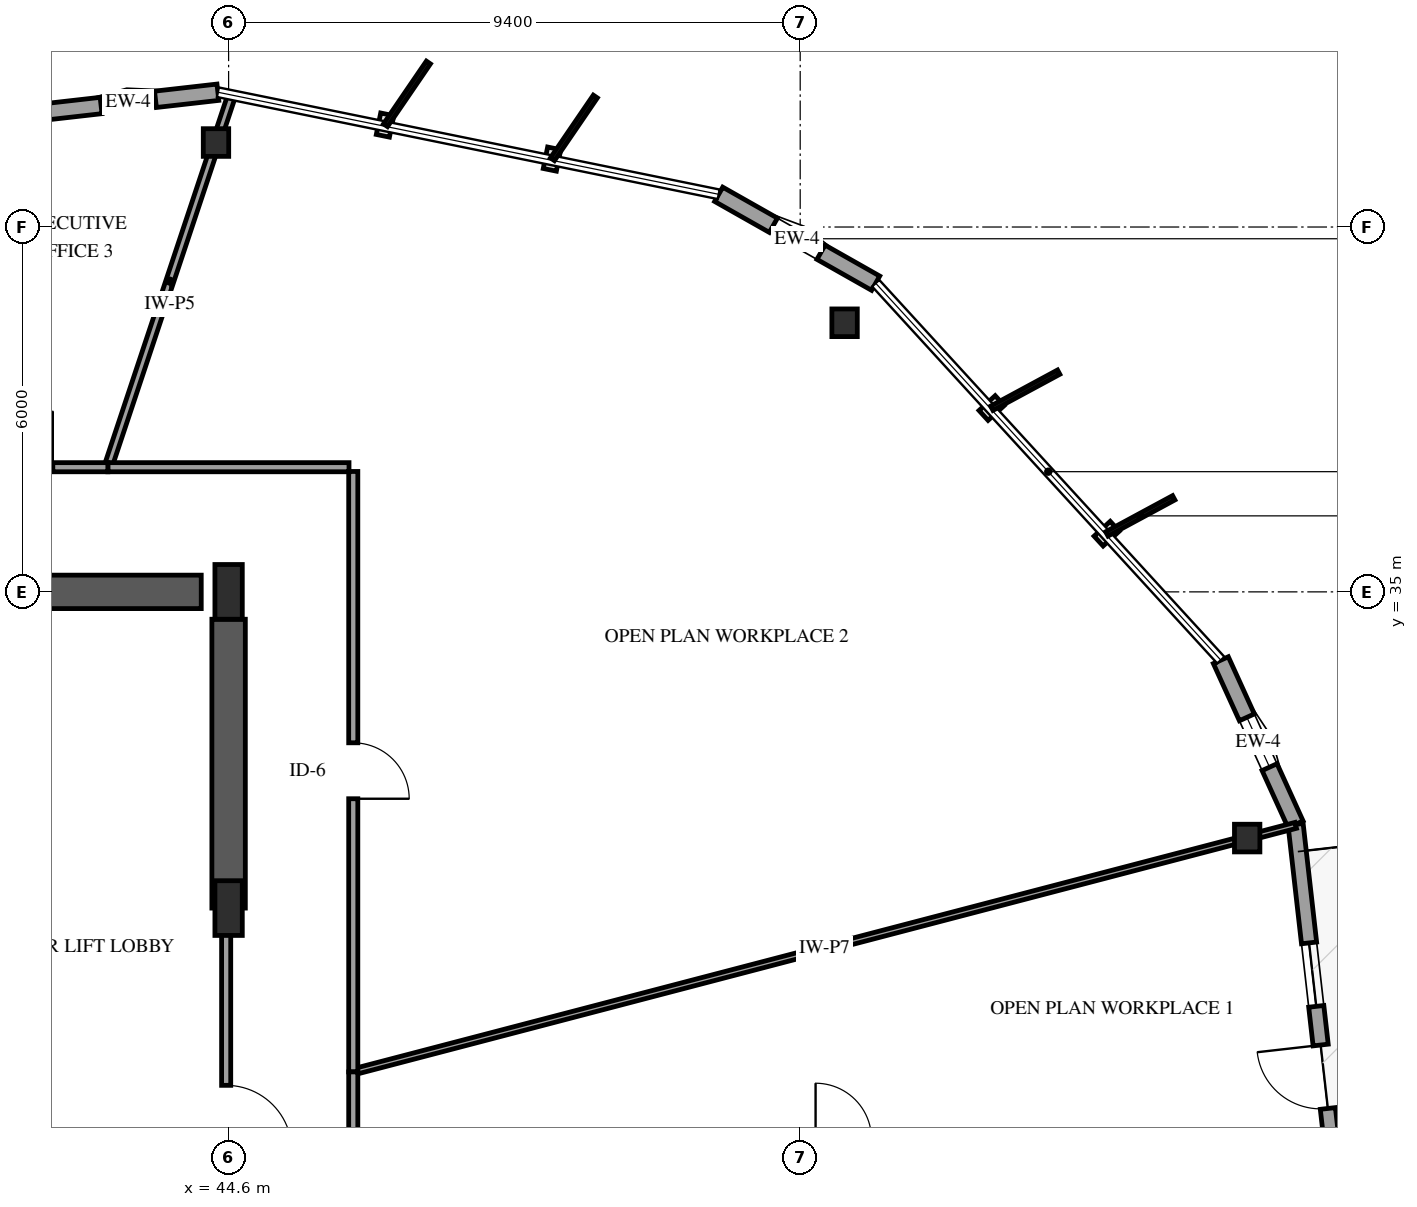
"""IFC4 building model, lengths in metres.
Left out: names, types, materials, properties, quantities, classifications, styles, units other than length and angle.
Written with IfcOpenShell. Run it as: python <this file> out.ifc"""

import sys

from ifc_helpers import new_model, si_unit, direction, frame, frame_2d, origin, origin_2d, place, context, subcontext, project, spatial, rectangle, i_section, extrude, element, fill, save


model = new_model("IFC4")
c1 = context("Model", 3, precision=1e-05, world=origin(), true_north=direction((0.0, 1.0)))
c2 = subcontext(c1, "Body", "Model", "MODEL_VIEW")
j1 = project(units=[si_unit("LENGTHUNIT", "METRE"), si_unit("PLANEANGLEUNIT", "RADIAN")], contexts=[c1])
p1 = place(None, origin())
s1 = spatial("IfcSite", under=j1, at=p1, CompositionType="ELEMENT")
p2 = place(p1, origin())
s2 = spatial("IfcBuilding", under=s1, at=p2, CompositionType="ELEMENT")
p3 = place(p2, frame((0.0, 0.0, 122.5)))
s3 = spatial("IfcBuildingStorey", under=s2, at=p3, CompositionType="ELEMENT", Elevation=122.5)
p4 = place(p3, frame((41.3, 35.0, 0.0), z_axis=(0.0, 0.0, 1.0), x_axis=(1.0, 0.0, 0.0)))
e1 = element("IfcWall", 1, at=p4, inside=s3, PredefinedType="SHEAR", context=c2, shape_type="SweptSolid", body=[
    extrude(rectangle(XDim=2.85, YDim=0.55, at=frame_2d((1.425, 0.0))), origin(), (0.0, 0.0, 1.0), 3.9),
])
p5 = place(p3, frame((44.6, 29.8, 0.0), z_axis=(0.0, 0.0, 1.0), x_axis=(0.0, 1.0, 0.0)))
e2 = element("IfcWall", 2, at=p5, inside=s3, PredefinedType="SHEAR", context=c2, shape_type="SweptSolid", body=[
    extrude(rectangle(XDim=4.75, YDim=0.55, at=frame_2d((2.375, 0.0))), origin(), (0.0, 0.0, 1.0), 3.9),
])
for number, where, z_axis, x_axis in (
    (3, (44.6, 29.8, 0.0), (0.0, 0.0, 1.0), (1.0, 0.0, 0.0)),
    (4, (44.6, 35.0, 0.0), (0.0, 0.0, 1.0), (1.0, 0.0, 0.0)),
):
    element("IfcColumn", number, at=place(p3, frame(where, z_axis=z_axis, x_axis=x_axis)), inside=s3, PredefinedType="PILASTER", context=c2, shape_type="SweptSolid", body=[
        extrude(rectangle(XDim=0.45, YDim=0.9, at=origin_2d()), origin(), (0.0, 0.0, 1.0), 3.9),
    ])
for number, where, z_axis, x_axis in (
    (5, (61.351, 30.951, 0.0), (0.0, 0.0, 1.0), (1.0, 0.0, 0.0)),
    (6, (54.73, 39.425, 0.0), (0.0, 0.0, 1.0), (1.0, 0.0, 0.0)),
    (7, (44.393, 42.389, 0.0), (0.0, 0.0, 1.0), (1.0, 0.0, 0.0)),
):
    element("IfcColumn", number, at=place(p3, frame(where, z_axis=z_axis, x_axis=x_axis)), inside=s3, PredefinedType="COLUMN", context=c2, shape_type="SweptSolid", body=[
        extrude(i_section(OverallWidth=0.418, OverallDepth=0.455, WebThickness=0.042, FlangeThickness=0.068, FilletRadius=0.038, at=origin_2d()), origin(), (0.0, 0.0, 1.0), 3.9),
    ])
p6 = place(p3, frame((55.241, 40.076, 0.0), z_axis=(0.0, 0.0, 1.0), x_axis=(-0.870196274844, 0.492705229572, 0.0)))
e8 = element("IfcWall", 8, at=p6, inside=s3, PredefinedType="SOLIDWALL", context=c2, shape_type="SweptSolid", body=[
    extrude(rectangle(XDim=2.967, YDim=0.27, at=frame_2d((1.483, 0.0))), origin(), (0.0, 0.0, 1.0), 2.979),
])
p7 = place(p6, frame((1.033, 0.0, 0.75)))
e9 = element("IfcOpeningElement", 9, at=p7, cuts=e8, PredefinedType="OPENING", context=c2, shape_type="SweptSolid", body=[
    extrude(rectangle(XDim=0.9, YDim=1.5, at=frame_2d((0.45, 0.75))), frame((0.0, 0.145, 0.0), z_axis=(0.0, -1.0, 0.0), x_axis=(1.0, 0.0, 0.0)), (0.0, 0.0, 1.0), 0.29),
])
p8 = place(p3, frame((44.424, 43.217, 0.0), z_axis=(0.0, 0.0, 1.0), x_axis=(-0.993605674431, -0.11290599514, 0.0)))
e10 = element("IfcWall", 10, at=p8, inside=s3, PredefinedType="SOLIDWALL", context=c2, shape_type="SweptSolid", body=[
    extrude(rectangle(XDim=2.967, YDim=0.27, at=frame_2d((1.483, 0.0))), origin(), (0.0, 0.0, 1.0), 2.979),
])
p9 = place(p8, frame((1.033, 0.0, 0.75)))
e11 = element("IfcOpeningElement", 11, at=p9, cuts=e10, PredefinedType="OPENING", context=c2, shape_type="SweptSolid", body=[
    extrude(rectangle(XDim=0.9, YDim=1.5, at=frame_2d((0.45, 0.75))), frame((0.0, 0.145, 0.0), z_axis=(0.0, -1.0, 0.0), x_axis=(1.0, 0.0, 0.0)), (0.0, 0.0, 1.0), 0.29),
])
p10 = place(p3, frame((62.147, 31.177, 0.0), z_axis=(0.0, 0.0, 1.0), x_axis=(-0.41436090181, 0.910112654044, 0.0)))
e12 = element("IfcWall", 12, at=p10, inside=s3, PredefinedType="SOLIDWALL", context=c2, shape_type="SweptSolid", body=[
    extrude(rectangle(XDim=2.967, YDim=0.27, at=frame_2d((1.483, 0.0))), origin(), (0.0, 0.0, 1.0), 2.979),
])
p11 = place(p10, frame((1.033, 0.0, 0.75)))
e13 = element("IfcOpeningElement", 13, at=p11, cuts=e12, PredefinedType="OPENING", context=c2, shape_type="SweptSolid", body=[
    extrude(rectangle(XDim=0.9, YDim=1.5, at=frame_2d((0.45, 0.75))), frame((0.0, 0.145, 0.0), z_axis=(0.0, -1.0, 0.0), x_axis=(1.0, 0.0, 0.0)), (0.0, 0.0, 1.0), 0.29),
])
p12 = place(p3, frame((63.095, 22.826, 0.0), z_axis=(0.0, 0.0, 1.0), x_axis=(-0.112873191476, 0.993609401448, 0.0)))
e14 = element("IfcWall", 14, at=p12, inside=s3, PredefinedType="SOLIDWALL", context=c2, shape_type="SweptSolid", body=[
    extrude(rectangle(XDim=8.405, YDim=0.25, at=frame_2d((4.203, 0.0))), origin(), (0.0, 0.0, 1.0), 2.979),
])
p13 = place(p12, frame((3.703, 0.0, 0.0)))
e15 = element("IfcOpeningElement", 15, at=p13, cuts=e14, PredefinedType="OPENING", context=c2, shape_type="SweptSolid", body=[
    extrude(rectangle(XDim=1.05, YDim=2.15, at=frame_2d((0.525, 1.075))), frame((0.0, 0.135, 0.0), z_axis=(0.0, -1.0, 0.0), x_axis=(1.0, 0.0, 0.0)), (0.0, 0.0, 1.0), 0.27),
])
p14 = place(p12, frame((1.619, 0.0, 0.72)))
e16 = element("IfcOpeningElement", 16, at=p14, cuts=e14, PredefinedType="OPENING", context=c2, shape_type="SweptSolid", body=[
    extrude(rectangle(XDim=1.05, YDim=1.55, at=frame_2d((0.525, 0.775))), frame((0.0, 0.135, 0.0), z_axis=(0.0, -1.0, 0.0), x_axis=(1.0, 0.0, 0.0)), (0.0, 0.0, 1.0), 0.27),
])
p15 = place(p12, frame((5.393, 0.0, 0.72)))
e17 = element("IfcOpeningElement", 17, at=p15, cuts=e14, PredefinedType="OPENING", context=c2, shape_type="SweptSolid", body=[
    extrude(rectangle(XDim=1.05, YDim=1.55, at=frame_2d((0.525, 0.775))), frame((0.0, 0.135, 0.0), z_axis=(0.0, -1.0, 0.0), x_axis=(1.0, 0.0, 0.0)), (0.0, 0.0, 1.0), 0.27),
])
p16 = place(p3, frame((46.65, 27.106, 0.0), z_axis=(0.0, 0.0, 1.0), x_axis=(0.9674534554, 0.253049030101, 0.0)))
e18 = element("IfcWall", 18, at=p16, inside=s3, PredefinedType="PARTITIONING", context=c2, shape_type="SweptSolid", body=[
    extrude(rectangle(XDim=16.021, YDim=0.1, at=frame_2d((8.01, 0.0))), origin(), (0.0, 0.0, 1.0), 2.895),
])
p17 = place(p3, frame((46.65, 36.98, 0.0), z_axis=(0.0, 0.0, 1.0), x_axis=(0.0, -1.0, 0.0)))
e19 = element("IfcWall", 19, at=p17, inside=s3, PredefinedType="PARTITIONING", context=c2, shape_type="SweptSolid", body=[
    extrude(rectangle(XDim=9.874, YDim=0.15, at=frame_2d((4.937, 0.0))), origin(), (0.0, 0.0, 1.0), 3.6),
])
p18 = place(p17, frame((4.462, 0.0, 0.0)))
e20 = element("IfcOpeningElement", 20, at=p18, cuts=e19, PredefinedType="OPENING", context=c2, shape_type="SweptSolid", body=[
    extrude(rectangle(XDim=0.92, YDim=2.12, at=frame_2d((0.46, 1.06))), frame((0.0, 0.085, 0.0), z_axis=(0.0, -1.0, 0.0), x_axis=(1.0, 0.0, 0.0)), (0.0, 0.0, 1.0), 0.17),
])
p19 = place(p3, frame((44.56, 29.8, 0.0), z_axis=(0.0, 0.0, 1.0), x_axis=(0.0, -1.0, 0.0)))
e21 = element("IfcWall", 21, at=p19, inside=s3, PredefinedType="PARTITIONING", context=c2, shape_type="SweptSolid", body=[
    extrude(rectangle(XDim=6.91, YDim=0.15, at=frame_2d((3.455, 0.0))), origin(), (0.0, 0.0, 1.0), 2.64),
])
p20 = place(p19, frame((2.915, 0.0, 0.0)))
e22 = element("IfcOpeningElement", 22, at=p20, cuts=e21, PredefinedType="OPENING", context=c2, shape_type="SweptSolid", body=[
    extrude(rectangle(XDim=1.08, YDim=2.15, at=frame_2d((0.54, 1.075))), frame((0.0, 0.085, 0.0), z_axis=(0.0, -1.0, 0.0), x_axis=(1.0, 0.0, 0.0)), (0.0, 0.0, 1.0), 0.17),
])
p21 = place(p3, frame((42.614, 37.05, 0.0), z_axis=(0.0, 0.0, 1.0), x_axis=(0.31610286631, 0.948724922151, 0.0)))
e23 = element("IfcWall", 23, at=p21, inside=s3, PredefinedType="PARTITIONING", context=c2, shape_type="SweptSolid", body=[
    extrude(rectangle(XDim=6.451, YDim=0.13, at=frame_2d((3.225, 0.0))), origin(), (0.0, 0.0, 1.0), 2.895),
])
p22 = place(p3, frame((42.614, 37.05, 0.0), z_axis=(0.0, 0.0, 1.0), x_axis=(1.0, 0.0, 0.0)))
e24 = element("IfcWall", 24, at=p22, inside=s3, PredefinedType="PARTITIONING", context=c2, shape_type="SweptSolid", body=[
    extrude(rectangle(XDim=3.966, YDim=0.15, at=frame_2d((1.983, 0.0))), origin(), (0.0, 0.0, 1.0), 3.6),
])
p23 = place(p3, frame((39.914, 37.05, 0.0), z_axis=(0.0, 0.0, 1.0), x_axis=(1.0, 0.0, 0.0)))
e25 = element("IfcWall", 25, at=p23, inside=s3, PredefinedType="PARTITIONING", context=c2, shape_type="SweptSolid", body=[
    extrude(rectangle(XDim=2.7, YDim=0.15, at=frame_2d((1.35, 0.0))), origin(), (0.0, 0.0, 1.0), 3.6),
])
p24 = place(p23, frame((0.875, 0.0, 0.0)))
e26 = element("IfcOpeningElement", 26, at=p24, cuts=e25, PredefinedType="OPENING", context=c2, shape_type="SweptSolid", body=[
    extrude(rectangle(XDim=0.92, YDim=2.12, at=frame_2d((0.46, 1.06))), frame((0.0, 0.085, 0.0), z_axis=(0.0, -1.0, 0.0), x_axis=(1.0, 0.0, 0.0)), (0.0, 0.0, 1.0), 0.17),
])
p25 = place(p3, frame((46.65, 27.106, 0.0), z_axis=(0.0, 0.0, 1.0), x_axis=(0.0, -1.0, 0.0)))
e27 = element("IfcWall", 27, at=p25, inside=s3, PredefinedType="PARTITIONING", context=c2, shape_type="SweptSolid", body=[
    extrude(rectangle(XDim=1.036, YDim=0.15, at=frame_2d((0.518, 0.0))), origin(), (0.0, 0.0, 1.0), 3.6),
])
p26 = place(p7, origin())
e28 = element("IfcWindow", 28, at=p26, inside=s3, PartitioningType="SINGLE_PANEL", PredefinedType="WINDOW", context=c2, shape_type="SweptSolid", body=[
    extrude(rectangle(XDim=0.9, YDim=1.5, at=frame_2d((0.45, 0.75))), frame((0.0, 0.03, 0.0), z_axis=(0.0, -1.0, 0.0), x_axis=(1.0, 0.0, 0.0)), (0.0, 0.0, 1.0), 0.06),
])
fill(e9, e28)
p27 = place(p9, origin())
e29 = element("IfcWindow", 29, at=p27, inside=s3, PartitioningType="SINGLE_PANEL", PredefinedType="WINDOW", context=c2, shape_type="SweptSolid", body=[
    extrude(rectangle(XDim=0.9, YDim=1.5, at=frame_2d((0.45, 0.75))), frame((0.0, 0.03, 0.0), z_axis=(0.0, -1.0, 0.0), x_axis=(1.0, 0.0, 0.0)), (0.0, 0.0, 1.0), 0.06),
])
fill(e11, e29)
p28 = place(p11, origin())
e30 = element("IfcWindow", 30, at=p28, inside=s3, PartitioningType="SINGLE_PANEL", PredefinedType="WINDOW", context=c2, shape_type="SweptSolid", body=[
    extrude(rectangle(XDim=0.9, YDim=1.5, at=frame_2d((0.45, 0.75))), frame((0.0, 0.03, 0.0), z_axis=(0.0, -1.0, 0.0), x_axis=(1.0, 0.0, 0.0)), (0.0, 0.0, 1.0), 0.06),
])
fill(e13, e30)
p29 = place(p13, origin())
e31 = element("IfcDoor", 31, at=p29, inside=s3, OperationType="SINGLE_SWING_RIGHT", PredefinedType="DOOR", context=c2, shape_type="SweptSolid", body=[
    extrude(rectangle(XDim=1.05, YDim=2.15, at=frame_2d((0.525, 1.075))), frame((0.0, 0.025, 0.0), z_axis=(0.0, -1.0, 0.0), x_axis=(1.0, 0.0, 0.0)), (0.0, 0.0, 1.0), 0.05),
])
fill(e15, e31)
p30 = place(p15, origin())
e32 = element("IfcWindow", 32, at=p30, inside=s3, PartitioningType="SINGLE_PANEL", PredefinedType="WINDOW", context=c2, shape_type="SweptSolid", body=[
    extrude(rectangle(XDim=1.05, YDim=1.55, at=frame_2d((0.525, 0.775))), frame((0.0, 0.03, 0.0), z_axis=(0.0, -1.0, 0.0), x_axis=(1.0, 0.0, 0.0)), (0.0, 0.0, 1.0), 0.06),
])
fill(e17, e32)
p31 = place(p18, origin())
e33 = element("IfcDoor", 33, at=p31, inside=s3, OperationType="SINGLE_SWING_RIGHT", PredefinedType="DOOR", context=c2, shape_type="SweptSolid", body=[
    extrude(rectangle(XDim=0.92, YDim=2.12, at=frame_2d((0.46, 1.06))), frame((0.0, 0.025, 0.0), z_axis=(0.0, -1.0, 0.0), x_axis=(1.0, 0.0, 0.0)), (0.0, 0.0, 1.0), 0.05),
])
fill(e20, e33)
p32 = place(p20, origin())
e34 = element("IfcDoor", 34, at=p32, inside=s3, OperationType="SINGLE_SWING_RIGHT", PredefinedType="DOOR", context=c2, shape_type="SweptSolid", body=[
    extrude(rectangle(XDim=1.08, YDim=2.15, at=frame_2d((0.54, 1.075))), frame((0.0, 0.025, 0.0), z_axis=(0.0, -1.0, 0.0), x_axis=(1.0, 0.0, 0.0)), (0.0, 0.0, 1.0), 0.05),
])
fill(e22, e34)
save(model, sys.argv[1])
